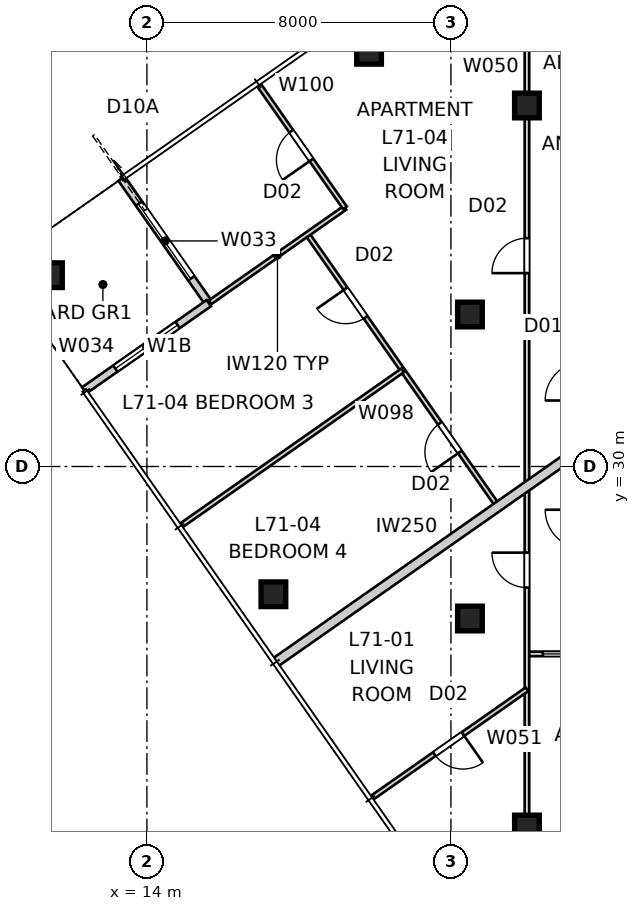
"""IFC4 building model, lengths in metres.
Left out: names, types, materials, properties, quantities, classifications, styles, units other than length and angle.
Written with IfcOpenShell. Run it as: python <this file> out.ifc"""

import sys

from ifc_helpers import new_model, si_unit, direction, frame, frame_2d, origin, origin_2d, place, context, subcontext, project, spatial, rectangle, extrude, element, fill, save


model = new_model("IFC4")
c1 = context("Model", 3, precision=1e-05, world=origin(), true_north=direction((0.0, 1.0)))
c2 = subcontext(c1, "Body", "Model", "MODEL_VIEW")
j1 = project(units=[si_unit("LENGTHUNIT", "METRE"), si_unit("PLANEANGLEUNIT", "RADIAN")], contexts=[c1])
p1 = place(None, origin())
s1 = spatial("IfcSite", under=j1, at=p1, CompositionType="ELEMENT")
p2 = place(p1, origin())
s2 = spatial("IfcBuilding", under=s1, at=p2, CompositionType="ELEMENT")
p3 = place(p2, frame((0.0, 0.0, 257.4)))
s3 = spatial("IfcBuildingStorey", under=s2, at=p3, CompositionType="ELEMENT", Elevation=257.4)
for number, where, z_axis, x_axis in (
    (1, (19.845, 40.914, 0.0), (0.0, 0.0, 1.0), (1.0, 0.0, 0.0)),
    (2, (11.449, 35.034, 0.0), (0.0, 0.0, 1.0), (1.0, 0.0, 0.0)),
    (3, (17.328, 26.638, 0.0), (0.0, 0.0, 1.0), (1.0, 0.0, 0.0)),
    (4, (24.0, 39.5, 0.0), (0.0, 0.0, 1.0), (1.0, 0.0, 0.0)),
    (5, (22.5, 34.0, 0.0), (0.0, 0.0, 1.0), (1.0, 0.0, 0.0)),
    (6, (22.5, 26.0, 0.0), (0.0, 0.0, 1.0), (1.0, 0.0, 0.0)),
    (7, (24.0, 20.5, 0.0), (0.0, 0.0, 1.0), (1.0, 0.0, 0.0)),
):
    element("IfcColumn", number, at=place(p3, frame(where, z_axis=z_axis, x_axis=x_axis)), inside=s3, PredefinedType="COLUMN", context=c2, shape_type="SweptSolid", body=[
        extrude(rectangle(XDim=0.65, YDim=0.65, at=origin_2d()), origin(), (0.0, 0.0, 1.0), 3.4),
    ])
p4 = place(p3, frame((13.333, 37.574, 0.0), z_axis=(0.0, 0.0, 1.0), x_axis=(0.573556557423, -0.819165963305, 0.0)))
e8 = element("IfcWall", 8, at=p4, inside=s3, PredefinedType="SOLIDWALL", context=c2, shape_type="SweptSolid", body=[
    extrude(rectangle(XDim=4.0, YDim=0.2, at=frame_2d((2.0, 0.0))), origin(), (0.0, 0.0, 1.0), 3.25),
])
p5 = place(p4, frame((0.8, 0.0, 0.0)))
e9 = element("IfcOpeningElement", 9, at=p5, cuts=e8, PredefinedType="OPENING", context=c2, shape_type="SweptSolid", body=[
    extrude(rectangle(XDim=2.4, YDim=2.1, at=frame_2d((1.2, 1.05))), frame((0.0, 0.11, 0.0), z_axis=(0.0, -1.0, 0.0), x_axis=(1.0, 0.0, 0.0)), (0.0, 0.0, 1.0), 0.22),
])
p6 = place(p3, frame((15.627, 34.298, 0.0), z_axis=(0.0, 0.0, 1.0), x_axis=(-0.819137286189, -0.573597512525, 0.0)))
e10 = element("IfcWall", 10, at=p6, inside=s3, PredefinedType="SOLIDWALL", context=c2, shape_type="SweptSolid", body=[
    extrude(rectangle(XDim=4.0, YDim=0.2, at=frame_2d((2.0, 0.0))), origin(), (0.0, 0.0, 1.0), 3.25),
])
p7 = place(p6, frame((1.0, 0.0, 0.45)))
e11 = element("IfcOpeningElement", 11, at=p7, cuts=e10, PredefinedType="OPENING", context=c2, shape_type="SweptSolid", body=[
    extrude(rectangle(XDim=2.0, YDim=1.8, at=frame_2d((1.0, 0.9))), frame((0.0, 0.11, 0.0), z_axis=(0.0, -1.0, 0.0), x_axis=(1.0, 0.0, 0.0)), (0.0, 0.0, 1.0), 0.22),
])
p8 = place(p3, frame((22.388, 17.668, 0.0), z_axis=(0.0, 0.0, 1.0), x_axis=(0.819161528122, 0.573562891796, 0.0)))
e12 = element("IfcWall", 12, at=p8, inside=s3, PredefinedType="PARTITIONING", context=c2, shape_type="SweptSolid", body=[
    extrude(rectangle(XDim=6.681, YDim=0.25, at=frame_2d((3.341, 0.0))), origin(), (0.0, 0.0, 1.0), 3.25),
])
p9 = place(p3, frame((17.369, 24.836, 0.0), z_axis=(0.0, 0.0, 1.0), x_axis=(0.81915902312, 0.573566469418, 0.0)))
e13 = element("IfcWall", 13, at=p9, inside=s3, PredefinedType="PARTITIONING", context=c2, shape_type="SweptSolid", body=[
    extrude(rectangle(XDim=9.756, YDim=0.25, at=frame_2d((4.878, 0.0))), origin(), (0.0, 0.0, 1.0), 3.25),
])
p10 = place(p3, frame((27.9, 25.068, 0.0), z_axis=(0.0, 0.0, 1.0), x_axis=(-1.0, 0.0, 0.0)))
e14 = element("IfcWall", 14, at=p10, inside=s3, PredefinedType="PARTITIONING", context=c2, shape_type="SweptSolid", body=[
    extrude(rectangle(XDim=3.9, YDim=0.12, at=frame_2d((1.95, 0.0))), origin(), (0.0, 0.0, 1.0), 3.25),
])
p11 = place(p10, frame((2.52, 0.0, 0.0)))
e15 = element("IfcOpeningElement", 15, at=p11, cuts=e14, PredefinedType="OPENING", context=c2, shape_type="SweptSolid", body=[
    extrude(rectangle(XDim=0.96, YDim=2.1, at=frame_2d((0.48, 1.05))), frame((0.0, 0.07, 0.0), z_axis=(0.0, -1.0, 0.0), x_axis=(1.0, 0.0, 0.0)), (0.0, 0.0, 1.0), 0.14),
])
p12 = place(p3, frame((24.0, 18.797, 0.0), z_axis=(0.0, 0.0, 1.0), x_axis=(0.0, 1.0, 0.0)))
e16 = element("IfcWall", 16, at=p12, inside=s3, PredefinedType="PARTITIONING", context=c2, shape_type="SweptSolid", body=[
    extrude(rectangle(XDim=26.198, YDim=0.12, at=frame_2d((13.099, 0.0))), origin(), (0.0, 0.0, 1.0), 2.55),
])
p13 = place(p12, frame((8.016, 0.0, 0.0)))
e17 = element("IfcOpeningElement", 17, at=p13, cuts=e16, PredefinedType="OPENING", context=c2, shape_type="SweptSolid", body=[
    extrude(rectangle(XDim=0.92, YDim=2.34, at=frame_2d((0.46, 1.17))), frame((0.0, 0.07, 0.0), z_axis=(0.0, -1.0, 0.0), x_axis=(1.0, 0.0, 0.0)), (0.0, 0.0, 1.0), 0.14),
])
p14 = place(p12, frame((16.292, 0.0, 0.0)))
e18 = element("IfcOpeningElement", 18, at=p14, cuts=e16, PredefinedType="OPENING", context=c2, shape_type="SweptSolid", body=[
    extrude(rectangle(XDim=0.92, YDim=2.34, at=frame_2d((0.46, 1.17))), frame((0.0, 0.07, 0.0), z_axis=(0.0, -1.0, 0.0), x_axis=(1.0, 0.0, 0.0)), (0.0, 0.0, 1.0), 0.14),
])
p15 = place(p3, frame((24.0, 24.138, 0.0), z_axis=(0.0, 0.0, 1.0), x_axis=(-0.819144584763, -0.57358708951, 0.0)))
e19 = element("IfcWall", 19, at=p15, inside=s3, PredefinedType="PARTITIONING", context=c2, shape_type="SweptSolid", body=[
    extrude(rectangle(XDim=4.991, YDim=0.12, at=frame_2d((2.496, 0.0))), origin(), (0.0, 0.0, 1.0), 3.25),
])
p16 = place(p15, frame((2.055, 0.0, 0.0)))
e20 = element("IfcOpeningElement", 20, at=p16, cuts=e19, PredefinedType="OPENING", context=c2, shape_type="SweptSolid", body=[
    extrude(rectangle(XDim=0.92, YDim=2.34, at=frame_2d((0.46, 1.17))), frame((0.0, 0.07, 0.0), z_axis=(0.0, -1.0, 0.0), x_axis=(1.0, 0.0, 0.0)), (0.0, 0.0, 1.0), 0.14),
])
p17 = place(p3, frame((23.24, 28.947, 0.0), z_axis=(0.0, 0.0, 1.0), x_axis=(-0.573582185905, 0.819148018378, 0.0)))
e21 = element("IfcWall", 21, at=p17, inside=s3, PredefinedType="PARTITIONING", context=c2, shape_type="SweptSolid", body=[
    extrude(rectangle(XDim=8.75, YDim=0.12, at=frame_2d((4.375, 0.0))), origin(), (0.0, 0.0, 1.0), 3.25),
])
p18 = place(p17, frame((6.078, 0.0, 0.0)))
e22 = element("IfcOpeningElement", 22, at=p18, cuts=e21, PredefinedType="OPENING", context=c2, shape_type="SweptSolid", body=[
    extrude(rectangle(XDim=0.92, YDim=2.34, at=frame_2d((0.46, 1.17))), frame((0.0, 0.07, 0.0), z_axis=(0.0, -1.0, 0.0), x_axis=(1.0, 0.0, 0.0)), (0.0, 0.0, 1.0), 0.14),
])
p19 = place(p17, frame((1.752, 0.0, 0.0)))
e23 = element("IfcOpeningElement", 23, at=p19, cuts=e21, PredefinedType="OPENING", context=c2, shape_type="SweptSolid", body=[
    extrude(rectangle(XDim=0.92, YDim=2.34, at=frame_2d((0.46, 1.17))), frame((0.0, 0.07, 0.0), z_axis=(0.0, -1.0, 0.0), x_axis=(1.0, 0.0, 0.0)), (0.0, 0.0, 1.0), 0.14),
])
p20 = place(p3, frame((15.66, 34.321, 0.0), z_axis=(0.0, 0.0, 1.0), x_axis=(0.819139307094, 0.573594626521, 0.0)))
e24 = element("IfcWall", 24, at=p20, inside=s3, PredefinedType="PARTITIONING", context=c2, shape_type="SweptSolid", body=[
    extrude(rectangle(XDim=4.335, YDim=0.12, at=frame_2d((2.167, 0.0))), origin(), (0.0, 0.0, 1.0), 3.25),
])
p21 = place(p3, frame((19.211, 36.807, 0.0), z_axis=(0.0, 0.0, 1.0), x_axis=(-0.573578200724, 0.819150808859, 0.0)))
e25 = element("IfcWall", 25, at=p21, inside=s3, PredefinedType="PARTITIONING", context=c2, shape_type="SweptSolid", body=[
    extrude(rectangle(XDim=3.96, YDim=0.12, at=frame_2d((1.98, 0.0))), origin(), (0.0, 0.0, 1.0), 3.25),
])
p22 = place(p21, frame((1.54, 0.0, 0.0)))
e26 = element("IfcOpeningElement", 26, at=p22, cuts=e25, PredefinedType="OPENING", context=c2, shape_type="SweptSolid", body=[
    extrude(rectangle(XDim=0.92, YDim=2.34, at=frame_2d((0.46, 1.17))), frame((0.0, 0.07, 0.0), z_axis=(0.0, -1.0, 0.0), x_axis=(1.0, 0.0, 0.0)), (0.0, 0.0, 1.0), 0.14),
])
p23 = place(p3, frame((20.731, 32.53, 0.0), z_axis=(0.0, 0.0, 1.0), x_axis=(-0.819153056029, -0.573574991434, 0.0)))
e27 = element("IfcWall", 27, at=p23, inside=s3, PredefinedType="PARTITIONING", context=c2, shape_type="SweptSolid", body=[
    extrude(rectangle(XDim=7.127, YDim=0.12, at=frame_2d((3.563, 0.0))), origin(), (0.0, 0.0, 1.0), 3.25),
])
p24 = place(p5, origin())
e28 = element("IfcDoor", 28, at=p24, inside=s3, OperationType="SLIDING_TO_LEFT", PredefinedType="DOOR", context=c2, shape_type="SweptSolid", body=[
    extrude(rectangle(XDim=2.4, YDim=2.1, at=frame_2d((1.2, 1.05))), frame((0.0, 0.025, 0.0), z_axis=(0.0, -1.0, 0.0), x_axis=(1.0, 0.0, 0.0)), (0.0, 0.0, 1.0), 0.05),
])
fill(e9, e28)
p25 = place(p7, origin())
e29 = element("IfcWindow", 29, at=p25, inside=s3, PartitioningType="SINGLE_PANEL", PredefinedType="WINDOW", context=c2, shape_type="SweptSolid", body=[
    extrude(rectangle(XDim=2.0, YDim=1.8, at=frame_2d((1.0, 0.9))), frame((0.0, 0.03, 0.0), z_axis=(0.0, -1.0, 0.0), x_axis=(1.0, 0.0, 0.0)), (0.0, 0.0, 1.0), 0.06),
])
fill(e11, e29)
p26 = place(p13, origin())
e30 = element("IfcDoor", 30, at=p26, inside=s3, OperationType="SINGLE_SWING_RIGHT", PredefinedType="DOOR", context=c2, shape_type="SweptSolid", body=[
    extrude(rectangle(XDim=0.92, YDim=2.34, at=frame_2d((0.46, 1.17))), frame((0.0, 0.025, 0.0), z_axis=(0.0, -1.0, 0.0), x_axis=(1.0, 0.0, 0.0)), (0.0, 0.0, 1.0), 0.05),
])
fill(e17, e30)
p27 = place(p11, origin())
e31 = element("IfcDoor", 31, at=p27, inside=s3, OperationType="SLIDING_TO_LEFT", PredefinedType="DOOR", context=c2, shape_type="SweptSolid", body=[
    extrude(rectangle(XDim=0.96, YDim=2.1, at=frame_2d((0.48, 1.05))), frame((0.0, 0.025, 0.0), z_axis=(0.0, -1.0, 0.0), x_axis=(1.0, 0.0, 0.0)), (0.0, 0.0, 1.0), 0.05),
])
fill(e15, e31)
p28 = place(p14, origin())
e32 = element("IfcDoor", 32, at=p28, inside=s3, OperationType="SINGLE_SWING_LEFT", PredefinedType="DOOR", context=c2, shape_type="SweptSolid", body=[
    extrude(rectangle(XDim=0.92, YDim=2.34, at=frame_2d((0.46, 1.17))), frame((0.0, 0.025, 0.0), z_axis=(0.0, -1.0, 0.0), x_axis=(1.0, 0.0, 0.0)), (0.0, 0.0, 1.0), 0.05),
])
fill(e18, e32)
p29 = place(p16, origin())
e33 = element("IfcDoor", 33, at=p29, inside=s3, OperationType="SINGLE_SWING_LEFT", PredefinedType="DOOR", context=c2, shape_type="SweptSolid", body=[
    extrude(rectangle(XDim=0.92, YDim=2.34, at=frame_2d((0.46, 1.17))), frame((0.0, 0.025, 0.0), z_axis=(0.0, -1.0, 0.0), x_axis=(1.0, 0.0, 0.0)), (0.0, 0.0, 1.0), 0.05),
])
fill(e20, e33)
p30 = place(p18, origin())
e34 = element("IfcDoor", 34, at=p30, inside=s3, OperationType="SINGLE_SWING_RIGHT", PredefinedType="DOOR", context=c2, shape_type="SweptSolid", body=[
    extrude(rectangle(XDim=0.92, YDim=2.34, at=frame_2d((0.46, 1.17))), frame((0.0, 0.025, 0.0), z_axis=(0.0, -1.0, 0.0), x_axis=(1.0, 0.0, 0.0)), (0.0, 0.0, 1.0), 0.05),
])
fill(e22, e34)
p31 = place(p19, origin())
e35 = element("IfcDoor", 35, at=p31, inside=s3, OperationType="SINGLE_SWING_LEFT", PredefinedType="DOOR", context=c2, shape_type="SweptSolid", body=[
    extrude(rectangle(XDim=0.92, YDim=2.34, at=frame_2d((0.46, 1.17))), frame((0.0, 0.025, 0.0), z_axis=(0.0, -1.0, 0.0), x_axis=(1.0, 0.0, 0.0)), (0.0, 0.0, 1.0), 0.05),
])
fill(e23, e35)
p32 = place(p22, origin())
e36 = element("IfcDoor", 36, at=p32, inside=s3, OperationType="SINGLE_SWING_LEFT", PredefinedType="DOOR", context=c2, shape_type="SweptSolid", body=[
    extrude(rectangle(XDim=0.92, YDim=2.34, at=frame_2d((0.46, 1.17))), frame((0.0, 0.025, 0.0), z_axis=(0.0, -1.0, 0.0), x_axis=(1.0, 0.0, 0.0)), (0.0, 0.0, 1.0), 0.05),
])
fill(e26, e36)
save(model, sys.argv[1])
